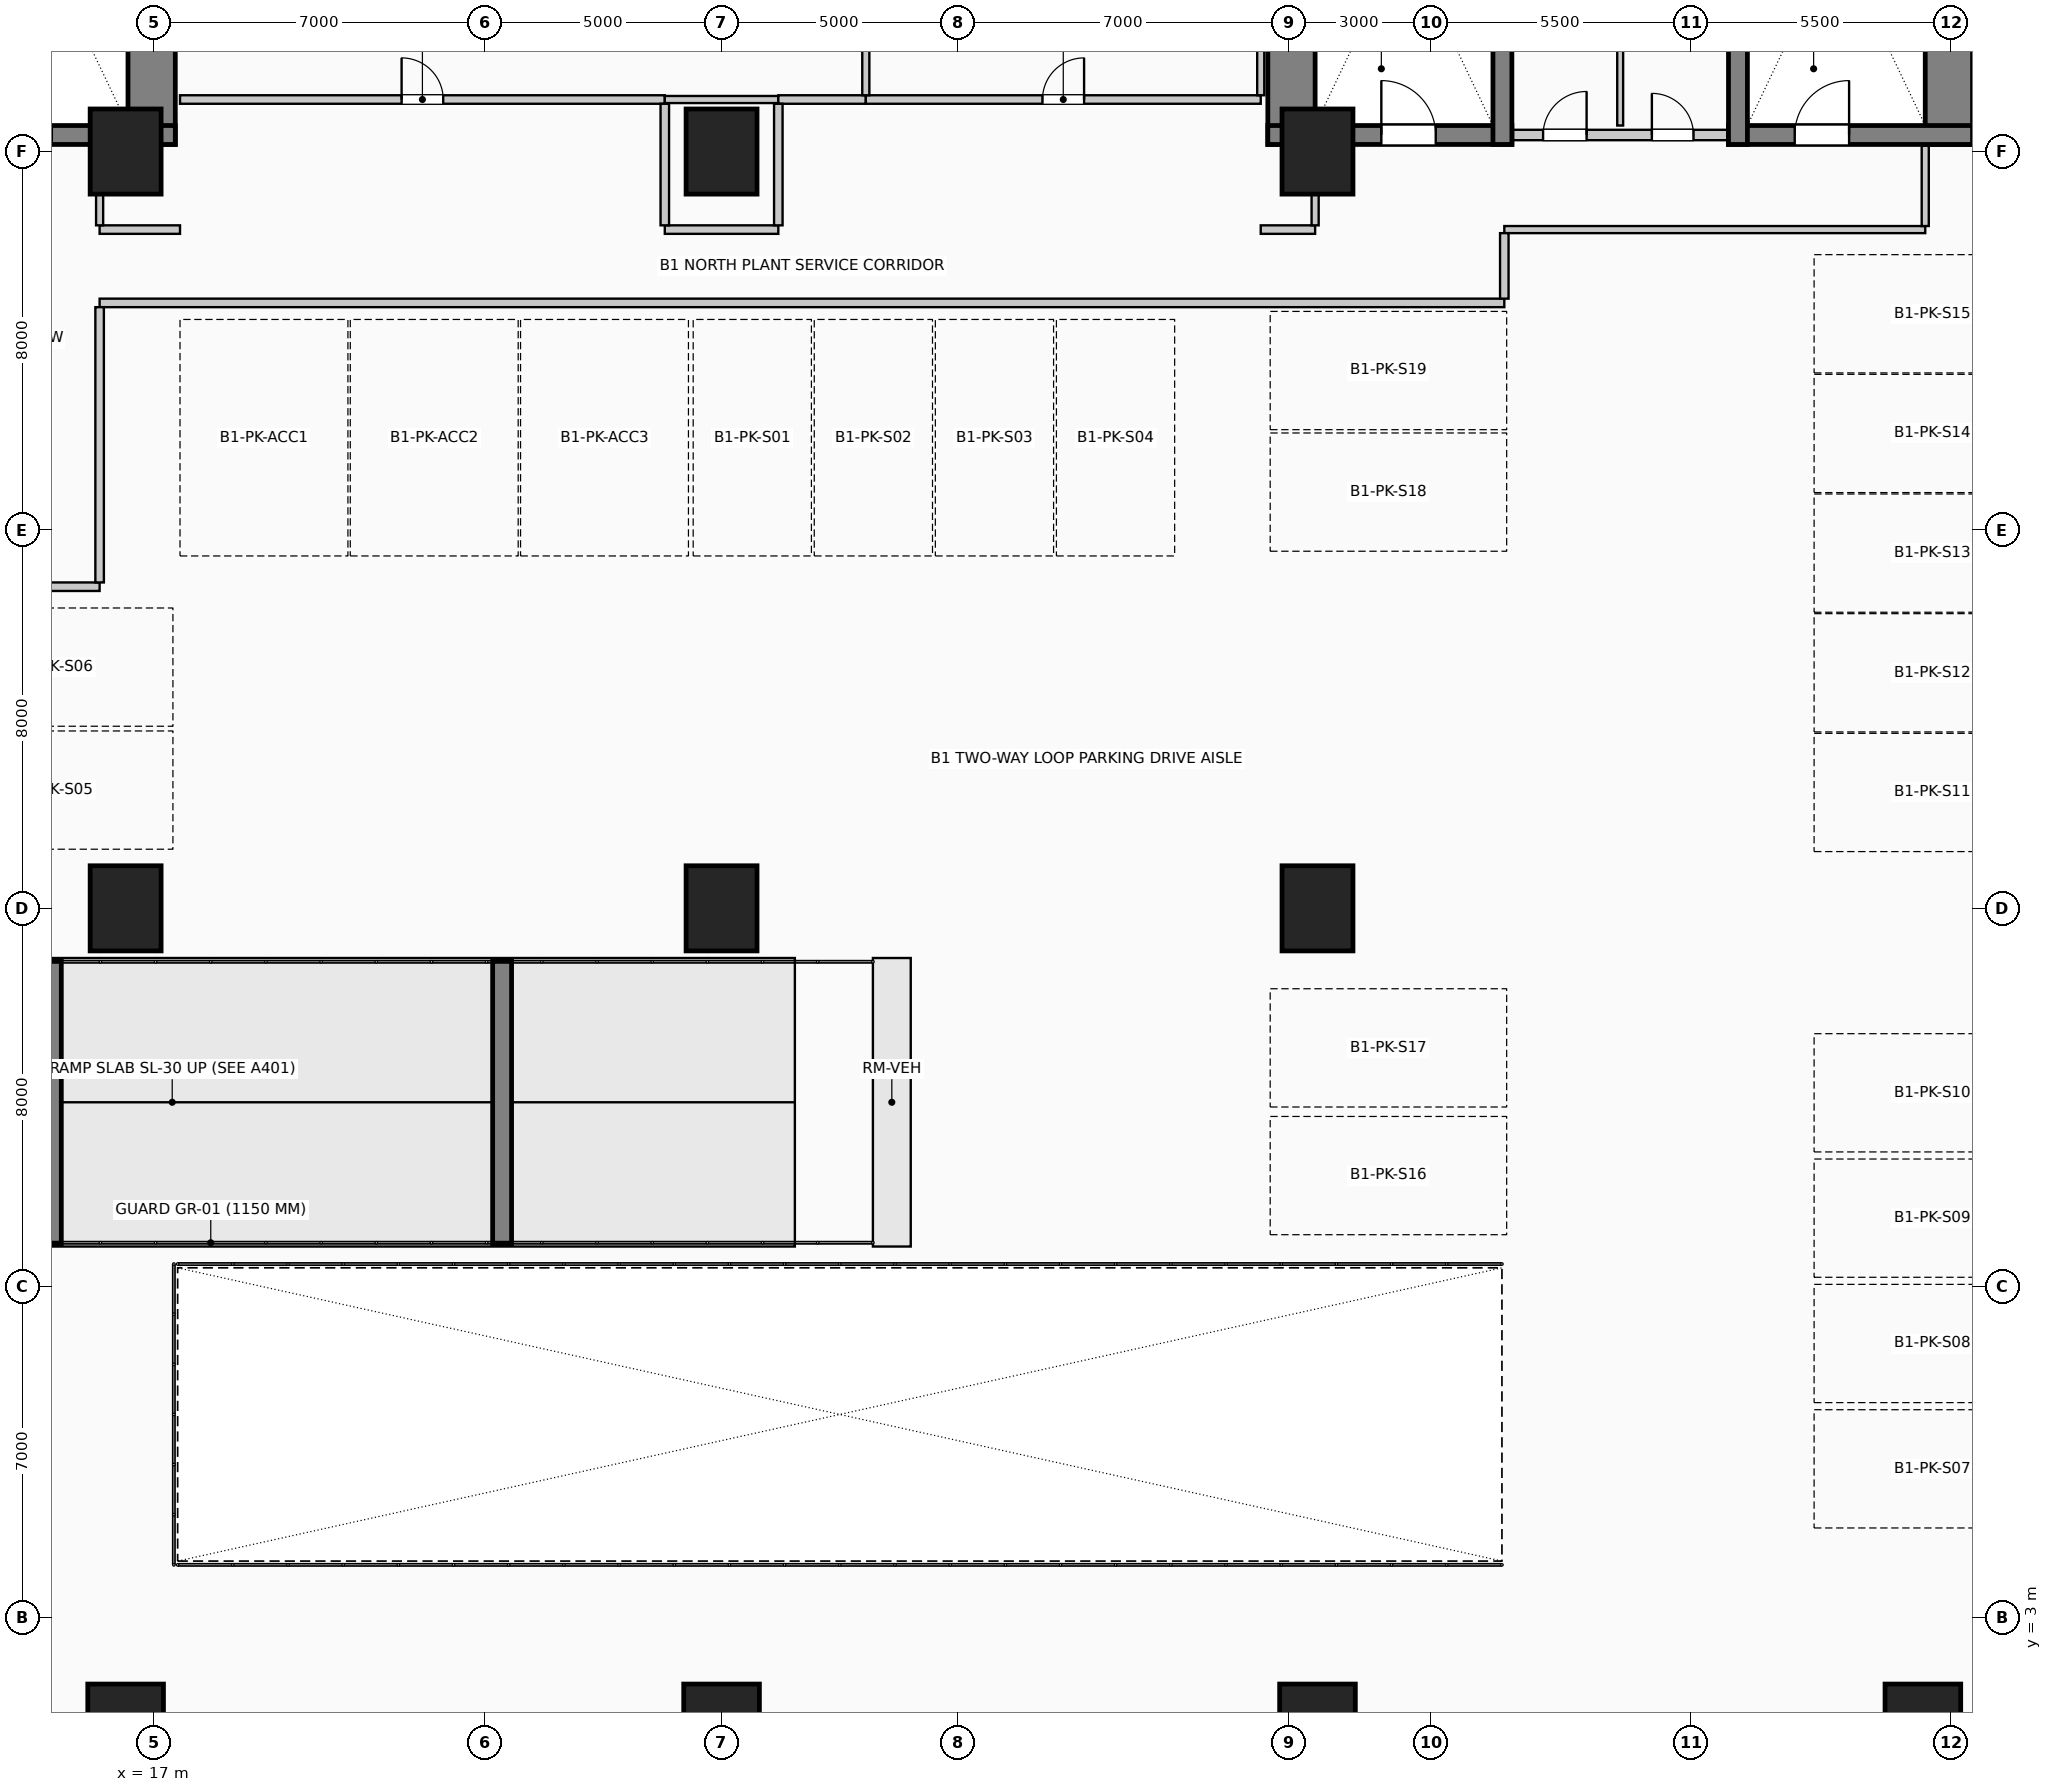
"""IFC4 building model, lengths in metres.
Left out: names, types, materials, properties, quantities, classifications, styles, units other than length and angle.
Written with IfcOpenShell. Run it as: python <this file> out.ifc"""

import sys

from ifc_helpers import new_model, si_unit, direction, frame, frame_2d, origin, origin_2d, place, context, subcontext, project, spatial, rectangle, extrude, element, fill, save


model = new_model("IFC4")
c1 = context("Model", 3, precision=1e-05, world=origin(), true_north=direction((0.0, 1.0)))
c2 = subcontext(c1, "Body", "Model", "MODEL_VIEW")
j1 = project(units=[si_unit("LENGTHUNIT", "METRE"), si_unit("PLANEANGLEUNIT", "RADIAN")], contexts=[c1])
p1 = place(None, origin())
s1 = spatial("IfcSite", under=j1, at=p1, CompositionType="ELEMENT")
p2 = place(p1, origin())
s2 = spatial("IfcBuilding", under=s1, at=p2, CompositionType="ELEMENT")
p3 = place(p2, frame((0.0, 0.0, -4.5)))
s3 = spatial("IfcBuildingStorey", under=s2, at=p3, CompositionType="ELEMENT", Elevation=-4.5)
p4 = place(p3, frame((16.95, 34.15, 0.0), z_axis=(0.0, 0.0, 1.0), x_axis=(0.0, 1.0, 0.0)))
e1 = element("IfcWall", 1, at=p4, inside=s3, PredefinedType="SHEAR", context=c2, shape_type="SweptSolid", body=[
    extrude(rectangle(XDim=9.28, YDim=1.0, at=frame_2d((4.64, 0.0))), origin(), (0.0, 0.0, 1.0), 4.5),
])
p5 = place(p3, frame((12.29, 34.35, 0.0), z_axis=(0.0, 0.0, 1.0), x_axis=(1.0, 0.0, 0.0)))
e2 = element("IfcWall", 2, at=p5, inside=s3, PredefinedType="SHEAR", context=c2, shape_type="SweptSolid", body=[
    extrude(rectangle(XDim=5.16, YDim=0.4, at=frame_2d((2.58, 0.0))), origin(), (0.0, 0.0, 1.0), 4.5),
])
p6 = place(p5, frame((1.4, 0.0, 0.0)))
e3 = element("IfcOpeningElement", 3, at=p6, cuts=e2, PredefinedType="OPENING", context=c2, shape_type="SweptSolid", body=[
    extrude(rectangle(XDim=1.15, YDim=2.2, at=frame_2d((0.575, 1.1))), frame((0.0, 0.21, 0.0), z_axis=(0.0, -1.0, 0.0), x_axis=(1.0, 0.0, 0.0)), (0.0, 0.0, 1.0), 0.42),
])
for number, where, z_axis, x_axis in (
    (4, (41.05, 34.15, 0.0), (0.0, 0.0, 1.0), (0.0, 1.0, 0.0)),
    (5, (54.95, 34.15, 0.0), (0.0, 0.0, 1.0), (0.0, 1.0, 0.0)),
):
    element("IfcWall", number, at=place(p3, frame(where, z_axis=z_axis, x_axis=x_axis)), inside=s3, PredefinedType="SHEAR", context=c2, shape_type="SweptSolid", body=[
        extrude(rectangle(XDim=9.28, YDim=1.0, at=frame_2d((4.64, 0.0))), origin(), (0.0, 0.0, 1.0), 4.5),
    ])
p7 = place(p3, frame((40.55, 34.35, 0.0), z_axis=(0.0, 0.0, 1.0), x_axis=(1.0, 0.0, 0.0)))
e6 = element("IfcWall", 6, at=p7, inside=s3, PredefinedType="SHEAR", context=c2, shape_type="SweptSolid", body=[
    extrude(rectangle(XDim=5.16, YDim=0.4, at=frame_2d((2.58, 0.0))), origin(), (0.0, 0.0, 1.0), 4.5),
])
p8 = place(p7, frame((2.4, 0.0, 0.0)))
e7 = element("IfcOpeningElement", 7, at=p8, cuts=e6, PredefinedType="OPENING", context=c2, shape_type="SweptSolid", body=[
    extrude(rectangle(XDim=1.15, YDim=2.2, at=frame_2d((0.575, 1.1))), frame((0.0, 0.21, 0.0), z_axis=(0.0, -1.0, 0.0), x_axis=(1.0, 0.0, 0.0)), (0.0, 0.0, 1.0), 0.42),
])
p9 = place(p3, frame((45.51, 34.15, 0.0), z_axis=(0.0, 0.0, 1.0), x_axis=(0.0, 1.0, 0.0)))
e8 = element("IfcWall", 8, at=p9, inside=s3, PredefinedType="SHEAR", context=c2, shape_type="SweptSolid", body=[
    extrude(rectangle(XDim=9.28, YDim=0.4, at=frame_2d((4.64, 0.0))), origin(), (0.0, 0.0, 1.0), 4.5),
])
p10 = place(p3, frame((50.29, 34.35, 0.0), z_axis=(0.0, 0.0, 1.0), x_axis=(1.0, 0.0, 0.0)))
e9 = element("IfcWall", 9, at=p10, inside=s3, PredefinedType="SHEAR", context=c2, shape_type="SweptSolid", body=[
    extrude(rectangle(XDim=5.16, YDim=0.4, at=frame_2d((2.58, 0.0))), origin(), (0.0, 0.0, 1.0), 4.5),
])
p11 = place(p10, frame((1.4, 0.0, 0.0)))
e10 = element("IfcOpeningElement", 10, at=p11, cuts=e9, PredefinedType="OPENING", context=c2, shape_type="SweptSolid", body=[
    extrude(rectangle(XDim=1.15, YDim=2.2, at=frame_2d((0.575, 1.1))), frame((0.0, 0.21, 0.0), z_axis=(0.0, -1.0, 0.0), x_axis=(1.0, 0.0, 0.0)), (0.0, 0.0, 1.0), 0.42),
])
p12 = place(p3, frame((50.49, 34.15, 0.0), z_axis=(0.0, 0.0, 1.0), x_axis=(0.0, 1.0, 0.0)))
e11 = element("IfcWall", 11, at=p12, inside=s3, PredefinedType="SHEAR", context=c2, shape_type="SweptSolid", body=[
    extrude(rectangle(XDim=9.28, YDim=0.4, at=frame_2d((4.64, 0.0))), origin(), (0.0, 0.0, 1.0), 4.5),
])
for number, where, z_axis, x_axis in (
    (12, (16.4, 0.6, 0.0), (0.0, 0.0, 1.0), (1.0, 0.0, 0.0)),
    (13, (29.0, 0.6, 0.0), (0.0, 0.0, 1.0), (1.0, 0.0, 0.0)),
    (14, (41.6, 0.6, 0.0), (0.0, 0.0, 1.0), (1.0, 0.0, 0.0)),
    (15, (54.4, 0.6, 0.0), (0.0, 0.0, 1.0), (1.0, 0.0, 0.0)),
):
    element("IfcColumn", number, at=place(p3, frame(where, z_axis=z_axis, x_axis=x_axis)), inside=s3, PredefinedType="COLUMN", context=c2, shape_type="SweptSolid", body=[
        extrude(rectangle(XDim=1.6, YDim=2.0, at=origin_2d()), origin(), (0.0, 0.0, 1.0), 4.5),
    ])
for number, where, z_axis, x_axis in (
    (16, (16.4, 18.0, 0.0), (0.0, 0.0, 1.0), (1.0, 0.0, 0.0)),
    (17, (16.4, 34.0, 0.0), (0.0, 0.0, 1.0), (1.0, 0.0, 0.0)),
    (18, (29.0, 18.0, 0.0), (0.0, 0.0, 1.0), (1.0, 0.0, 0.0)),
    (19, (29.0, 34.0, 0.0), (0.0, 0.0, 1.0), (1.0, 0.0, 0.0)),
    (20, (41.6, 18.0, 0.0), (0.0, 0.0, 1.0), (1.0, 0.0, 0.0)),
    (21, (41.6, 34.0, 0.0), (0.0, 0.0, 1.0), (1.0, 0.0, 0.0)),
):
    element("IfcColumn", number, at=place(p3, frame(where, z_axis=z_axis, x_axis=x_axis)), inside=s3, PredefinedType="COLUMN", context=c2, shape_type="SweptSolid", body=[
        extrude(rectangle(XDim=1.5, YDim=1.8, at=origin_2d()), origin(), (0.0, 0.0, 1.0), 4.5),
    ])
p13 = place(p3, frame((24.36, 10.9, 0.0), z_axis=(0.0, 0.0, 1.0), x_axis=(0.0, 1.0, 0.0)))
e22 = element("IfcWall", 22, at=p13, inside=s3, PredefinedType="SHEAR", context=c2, shape_type="SweptSolid", body=[
    extrude(rectangle(XDim=6.0, YDim=0.4, at=frame_2d((3.0, 0.0))), origin(), (0.0, 0.0, 1.0), 1.002),
])
p14 = place(p3, frame((14.84, 10.9, 0.0), z_axis=(0.0, 0.0, 1.0), x_axis=(0.0, 1.0, 0.0)))
e23 = element("IfcWall", 23, at=p14, inside=s3, PredefinedType="SHEAR", context=c2, shape_type="SweptSolid", body=[
    extrude(rectangle(XDim=6.0, YDim=0.4, at=frame_2d((3.0, 0.0))), origin(), (0.0, 0.0, 1.0), 2.532),
])
p15 = place(p3, frame((45.72, 34.35, 0.0), z_axis=(0.0, 0.0, 1.0), x_axis=(1.0, 0.0, 0.0)))
e24 = element("IfcWall", 24, at=p15, inside=s3, PredefinedType="PARTITIONING", context=c2, shape_type="SweptSolid", body=[
    extrude(rectangle(XDim=4.56, YDim=0.22, at=frame_2d((2.28, 0.0))), origin(), (0.0, 0.0, 1.0), 3.145),
])
p16 = place(p15, frame((0.65, 0.0, 0.0)))
e25 = element("IfcOpeningElement", 25, at=p16, cuts=e24, PredefinedType="OPENING", context=c2, shape_type="SweptSolid", body=[
    extrude(rectangle(XDim=0.92, YDim=2.1, at=frame_2d((0.46, 1.05))), frame((0.0, 0.12, 0.0), z_axis=(0.0, -1.0, 0.0), x_axis=(1.0, 0.0, 0.0)), (0.0, 0.0, 1.0), 0.24),
])
p17 = place(p15, frame((2.95, 0.0, 0.0)))
e26 = element("IfcOpeningElement", 26, at=p17, cuts=e24, PredefinedType="OPENING", context=c2, shape_type="SweptSolid", body=[
    extrude(rectangle(XDim=0.88, YDim=2.1, at=frame_2d((0.44, 1.05))), frame((0.0, 0.12, 0.0), z_axis=(0.0, -1.0, 0.0), x_axis=(1.0, 0.0, 0.0)), (0.0, 0.0, 1.0), 0.24),
])
p18 = place(p3, frame((12.33, 24.8, 0.0), z_axis=(0.0, 0.0, 1.0), x_axis=(1.0, 0.0, 0.0)))
e27 = element("IfcWall", 27, at=p18, inside=s3, PredefinedType="PARTITIONING", context=c2, shape_type="SweptSolid", body=[
    extrude(rectangle(XDim=3.52, YDim=0.18, at=frame_2d((1.76, 0.0))), origin(), (0.0, 0.0, 1.0), 4.1),
])
p19 = place(p3, frame((15.85, 30.8, 0.0), z_axis=(0.0, 0.0, 1.0), x_axis=(1.0, 0.0, 0.0)))
e28 = element("IfcWall", 28, at=p19, inside=s3, PredefinedType="PARTITIONING", context=c2, shape_type="SweptSolid", body=[
    extrude(rectangle(XDim=29.7, YDim=0.18, at=frame_2d((14.85, 0.0))), origin(), (0.0, 0.0, 1.0), 4.1),
])
p20 = place(p3, frame((15.85, 32.35, 0.0), z_axis=(0.0, 0.0, 1.0), x_axis=(1.0, 0.0, 0.0)))
e29 = element("IfcWall", 29, at=p20, inside=s3, PredefinedType="PARTITIONING", context=c2, shape_type="SweptSolid", body=[
    extrude(rectangle(XDim=1.7, YDim=0.18, at=frame_2d((0.85, 0.0))), origin(), (0.0, 0.0, 1.0), 4.1),
])
p21 = place(p3, frame((27.8, 32.35, 0.0), z_axis=(0.0, 0.0, 1.0), x_axis=(1.0, 0.0, 0.0)))
e30 = element("IfcWall", 30, at=p21, inside=s3, PredefinedType="PARTITIONING", context=c2, shape_type="SweptSolid", body=[
    extrude(rectangle(XDim=2.4, YDim=0.18, at=frame_2d((1.2, 0.0))), origin(), (0.0, 0.0, 1.0), 4.1),
])
p22 = place(p3, frame((40.4, 32.35, 0.0), z_axis=(0.0, 0.0, 1.0), x_axis=(1.0, 0.0, 0.0)))
e31 = element("IfcWall", 31, at=p22, inside=s3, PredefinedType="PARTITIONING", context=c2, shape_type="SweptSolid", body=[
    extrude(rectangle(XDim=1.15, YDim=0.18, at=frame_2d((0.575, 0.0))), origin(), (0.0, 0.0, 1.0), 4.1),
])
p23 = place(p3, frame((45.55, 32.35, 0.0), z_axis=(0.0, 0.0, 1.0), x_axis=(1.0, 0.0, 0.0)))
e32 = element("IfcWall", 32, at=p23, inside=s3, PredefinedType="PARTITIONING", context=c2, shape_type="SweptSolid", body=[
    extrude(rectangle(XDim=8.9, YDim=0.15, at=frame_2d((4.45, 0.0))), origin(), (0.0, 0.0, 1.0), 4.1),
])
p24 = place(p3, frame((17.55, 35.1, 0.0), z_axis=(0.0, 0.0, 1.0), x_axis=(1.0, 0.0, 0.0)))
e33 = element("IfcWall", 33, at=p24, inside=s3, PredefinedType="PARTITIONING", context=c2, shape_type="SweptSolid", body=[
    extrude(rectangle(XDim=10.25, YDim=0.18, at=frame_2d((5.125, 0.0))), origin(), (0.0, 0.0, 1.0), 4.1),
])
p25 = place(p24, frame((4.685, 0.0, 0.0)))
e34 = element("IfcOpeningElement", 34, at=p25, cuts=e33, PredefinedType="OPENING", context=c2, shape_type="SweptSolid", body=[
    extrude(rectangle(XDim=0.88, YDim=2.1, at=frame_2d((0.44, 1.05))), frame((0.0, 0.1, 0.0), z_axis=(0.0, -1.0, 0.0), x_axis=(1.0, 0.0, 0.0)), (0.0, 0.0, 1.0), 0.2),
])
p26 = place(p3, frame((27.8, 35.1, 0.0), z_axis=(0.0, 0.0, 1.0), x_axis=(1.0, 0.0, 0.0)))
e35 = element("IfcWall", 35, at=p26, inside=s3, PredefinedType="PARTITIONING", context=c2, shape_type="SweptSolid", body=[
    extrude(rectangle(XDim=2.4, YDim=0.15, at=frame_2d((1.2, 0.0))), origin(), (0.0, 0.0, 1.0), 4.1),
])
p27 = place(p3, frame((30.2, 35.1, 0.0), z_axis=(0.0, 0.0, 1.0), x_axis=(1.0, 0.0, 0.0)))
e36 = element("IfcWall", 36, at=p27, inside=s3, PredefinedType="PARTITIONING", context=c2, shape_type="SweptSolid", body=[
    extrude(rectangle(XDim=1.85, YDim=0.18, at=frame_2d((0.925, 0.0))), origin(), (0.0, 0.0, 1.0), 4.1),
])
p28 = place(p3, frame((32.05, 35.1, 0.0), z_axis=(0.0, 0.0, 1.0), x_axis=(1.0, 0.0, 0.0)))
e37 = element("IfcWall", 37, at=p28, inside=s3, PredefinedType="PARTITIONING", context=c2, shape_type="SweptSolid", body=[
    extrude(rectangle(XDim=8.35, YDim=0.18, at=frame_2d((4.175, 0.0))), origin(), (0.0, 0.0, 1.0), 4.1),
])
p29 = place(p28, frame((3.735, 0.0, 0.0)))
e38 = element("IfcOpeningElement", 38, at=p29, cuts=e37, PredefinedType="OPENING", context=c2, shape_type="SweptSolid", body=[
    extrude(rectangle(XDim=0.88, YDim=2.1, at=frame_2d((0.44, 1.05))), frame((0.0, 0.1, 0.0), z_axis=(0.0, -1.0, 0.0), x_axis=(1.0, 0.0, 0.0)), (0.0, 0.0, 1.0), 0.2),
])
p30 = place(p3, frame((15.85, 24.89, 0.0), z_axis=(0.0, 0.0, 1.0), x_axis=(0.0, 1.0, 0.0)))
e39 = element("IfcWall", 39, at=p30, inside=s3, PredefinedType="PARTITIONING", context=c2, shape_type="SweptSolid", body=[
    extrude(rectangle(XDim=5.82, YDim=0.18, at=frame_2d((2.91, 0.0))), origin(), (0.0, 0.0, 1.0), 4.1),
])
p31 = place(p3, frame((15.85, 32.44, 0.0), z_axis=(0.0, 0.0, 1.0), x_axis=(0.0, 1.0, 0.0)))
e40 = element("IfcWall", 40, at=p31, inside=s3, PredefinedType="PARTITIONING", context=c2, shape_type="SweptSolid", body=[
    extrude(rectangle(XDim=0.66, YDim=0.15, at=frame_2d((0.33, 0.0))), origin(), (0.0, 0.0, 1.0), 4.1),
])
for number, where, z_axis, x_axis in (
    (41, (27.8, 32.44, 0.0), (0.0, 0.0, 1.0), (0.0, 1.0, 0.0)),
    (42, (30.2, 32.44, 0.0), (0.0, 0.0, 1.0), (0.0, 1.0, 0.0)),
):
    element("IfcWall", number, at=place(p3, frame(where, z_axis=z_axis, x_axis=x_axis)), inside=s3, PredefinedType="PARTITIONING", context=c2, shape_type="SweptSolid", body=[
        extrude(rectangle(XDim=2.57, YDim=0.18, at=frame_2d((1.285, 0.0))), origin(), (0.0, 0.0, 1.0), 4.1),
    ])
for number, where, z_axis, x_axis in (
    (43, (32.05, 35.19, 0.0), (0.0, 0.0, 1.0), (0.0, 1.0, 0.0)),
    (44, (40.4, 35.19, 0.0), (0.0, 0.0, 1.0), (0.0, 1.0, 0.0)),
):
    element("IfcWall", number, at=place(p3, frame(where, z_axis=z_axis, x_axis=x_axis)), inside=s3, PredefinedType="PARTITIONING", context=c2, shape_type="SweptSolid", body=[
        extrude(rectangle(XDim=8.935, YDim=0.15, at=frame_2d((4.468, 0.0))), origin(), (0.0, 0.0, 1.0), 4.1),
    ])
p32 = place(p3, frame((41.55, 32.44, 0.0), z_axis=(0.0, 0.0, 1.0), x_axis=(0.0, 1.0, 0.0)))
e45 = element("IfcWall", 45, at=p32, inside=s3, PredefinedType="PARTITIONING", context=c2, shape_type="SweptSolid", body=[
    extrude(rectangle(XDim=0.66, YDim=0.15, at=frame_2d((0.33, 0.0))), origin(), (0.0, 0.0, 1.0), 3.145),
])
p33 = place(p3, frame((45.55, 30.89, 0.0), z_axis=(0.0, 0.0, 1.0), x_axis=(0.0, 1.0, 0.0)))
e46 = element("IfcWall", 46, at=p33, inside=s3, PredefinedType="PARTITIONING", context=c2, shape_type="SweptSolid", body=[
    extrude(rectangle(XDim=1.385, YDim=0.18, at=frame_2d((0.692, 0.0))), origin(), (0.0, 0.0, 1.0), 4.1),
])
p34 = place(p3, frame((48.0, 34.55, 0.0), z_axis=(0.0, 0.0, 1.0), x_axis=(0.0, 1.0, 0.0)))
e47 = element("IfcWall", 47, at=p34, inside=s3, PredefinedType="PARTITIONING", context=c2, shape_type="SweptSolid", body=[
    extrude(rectangle(XDim=7.475, YDim=0.125, at=frame_2d((3.737, 0.0))), origin(), (0.0, 0.0, 1.0), 4.1),
])
p35 = place(p3, frame((54.45, 32.425, 0.0), z_axis=(0.0, 0.0, 1.0), x_axis=(0.0, 1.0, 0.0)))
e48 = element("IfcWall", 48, at=p35, inside=s3, PredefinedType="PARTITIONING", context=c2, shape_type="SweptSolid", body=[
    extrude(rectangle(XDim=1.725, YDim=0.15, at=frame_2d((0.862, 0.0))), origin(), (0.0, 0.0, 1.0), 4.1),
])
p36 = place(p8, origin())
e49 = element("IfcDoor", 49, at=p36, inside=s3, OperationType="SINGLE_SWING_LEFT", PredefinedType="DOOR", context=c2, shape_type="SweptSolid", body=[
    extrude(rectangle(XDim=1.15, YDim=2.2, at=frame_2d((0.575, 1.1))), frame((0.0, 0.025, 0.0), z_axis=(0.0, -1.0, 0.0), x_axis=(1.0, 0.0, 0.0)), (0.0, 0.0, 1.0), 0.05),
])
fill(e7, e49)
p37 = place(p16, origin())
e50 = element("IfcDoor", 50, at=p37, inside=s3, OperationType="SINGLE_SWING_RIGHT", PredefinedType="DOOR", context=c2, shape_type="SweptSolid", body=[
    extrude(rectangle(XDim=0.92, YDim=2.1, at=frame_2d((0.46, 1.05))), frame((0.0, 0.025, 0.0), z_axis=(0.0, -1.0, 0.0), x_axis=(1.0, 0.0, 0.0)), (0.0, 0.0, 1.0), 0.05),
])
fill(e25, e50)
p38 = place(p17, origin())
e51 = element("IfcDoor", 51, at=p38, inside=s3, OperationType="SINGLE_SWING_LEFT", PredefinedType="DOOR", context=c2, shape_type="SweptSolid", body=[
    extrude(rectangle(XDim=0.88, YDim=2.1, at=frame_2d((0.44, 1.05))), frame((0.0, 0.025, 0.0), z_axis=(0.0, -1.0, 0.0), x_axis=(1.0, 0.0, 0.0)), (0.0, 0.0, 1.0), 0.05),
])
fill(e26, e51)
p39 = place(p11, origin())
e52 = element("IfcDoor", 52, at=p39, inside=s3, OperationType="SINGLE_SWING_RIGHT", PredefinedType="DOOR", context=c2, shape_type="SweptSolid", body=[
    extrude(rectangle(XDim=1.15, YDim=2.2, at=frame_2d((0.575, 1.1))), frame((0.0, 0.025, 0.0), z_axis=(0.0, -1.0, 0.0), x_axis=(1.0, 0.0, 0.0)), (0.0, 0.0, 1.0), 0.05),
])
fill(e10, e52)
p40 = place(p25, origin())
e53 = element("IfcDoor", 53, at=p40, inside=s3, OperationType="SINGLE_SWING_LEFT", PredefinedType="DOOR", context=c2, shape_type="SweptSolid", body=[
    extrude(rectangle(XDim=0.88, YDim=2.1, at=frame_2d((0.44, 1.05))), frame((0.0, 0.025, 0.0), z_axis=(0.0, -1.0, 0.0), x_axis=(1.0, 0.0, 0.0)), (0.0, 0.0, 1.0), 0.05),
])
fill(e34, e53)
p41 = place(p29, origin())
e54 = element("IfcDoor", 54, at=p41, inside=s3, OperationType="SINGLE_SWING_RIGHT", PredefinedType="DOOR", context=c2, shape_type="SweptSolid", body=[
    extrude(rectangle(XDim=0.88, YDim=2.1, at=frame_2d((0.44, 1.05))), frame((0.0, 0.025, 0.0), z_axis=(0.0, -1.0, 0.0), x_axis=(1.0, 0.0, 0.0)), (0.0, 0.0, 1.0), 0.05),
])
fill(e38, e54)
save(model, sys.argv[1])
